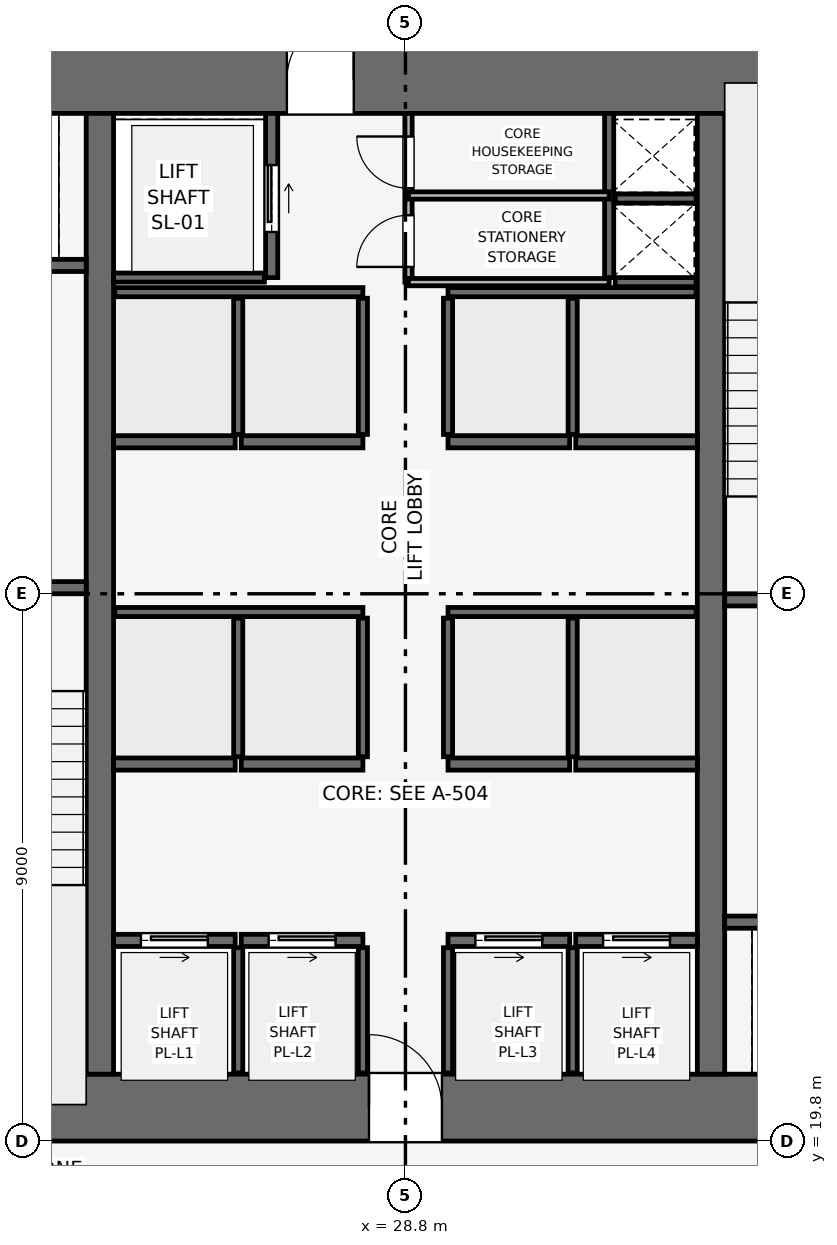
"""IFC4 building model, lengths in metres.
Left out: names, types, materials, properties, quantities, classifications, styles, units other than length and angle.
Written with IfcOpenShell. Run it as: python <this file> out.ifc"""

import sys

from ifc_helpers import new_model, si_unit, direction, frame, frame_2d, origin, place, context, subcontext, project, spatial, rectangle, extrude, element, fill, save


model = new_model("IFC4")
c1 = context("Model", 3, precision=1e-05, world=origin(), true_north=direction((0.0, 1.0)))
c2 = subcontext(c1, "Body", "Model", "MODEL_VIEW")
j1 = project(units=[si_unit("LENGTHUNIT", "METRE"), si_unit("PLANEANGLEUNIT", "RADIAN")], contexts=[c1])
p1 = place(None, origin())
s1 = spatial("IfcSite", under=j1, at=p1, CompositionType="ELEMENT")
p2 = place(p1, origin())
s2 = spatial("IfcBuilding", under=s1, at=p2, CompositionType="ELEMENT")
p3 = place(p2, frame((0.0, 0.0, 57.3)))
s3 = spatial("IfcBuildingStorey", under=s2, at=p3, CompositionType="ELEMENT", Elevation=57.3)
p4 = place(p3, frame((19.8, 20.35, 0.0), z_axis=(0.0, 0.0, 1.0), x_axis=(1.0, 0.0, 0.0)))
e1 = element("IfcWall", 1, at=p4, inside=s3, PredefinedType="SHEAR", context=c2, shape_type="SweptSolid", body=[
    extrude(rectangle(XDim=18.0, YDim=1.1, at=frame_2d((9.0, 0.0))), origin(), (0.0, 0.0, 1.0), 3.9),
])
p5 = place(p4, frame((8.4, 0.0, 0.0)))
e2 = element("IfcOpeningElement", 2, at=p5, cuts=e1, PredefinedType="OPENING", context=c2, shape_type="SweptSolid", body=[
    extrude(rectangle(XDim=1.2, YDim=2.2, at=frame_2d((0.6, 1.1))), frame((0.0, 0.56, 0.0), z_axis=(0.0, -1.0, 0.0), x_axis=(1.0, 0.0, 0.0)), (0.0, 0.0, 1.0), 1.12),
])
p6 = place(p3, frame((19.8, 37.25, 0.0), z_axis=(0.0, 0.0, 1.0), x_axis=(1.0, 0.0, 0.0)))
e3 = element("IfcWall", 3, at=p6, inside=s3, PredefinedType="SHEAR", context=c2, shape_type="SweptSolid", body=[
    extrude(rectangle(XDim=18.0, YDim=1.1, at=frame_2d((9.0, 0.0))), origin(), (0.0, 0.0, 1.0), 3.9),
])
p7 = place(p6, frame((7.05, 0.0, 0.0)))
e4 = element("IfcOpeningElement", 4, at=p7, cuts=e3, PredefinedType="OPENING", context=c2, shape_type="SweptSolid", body=[
    extrude(rectangle(XDim=1.1, YDim=2.15, at=frame_2d((0.55, 1.075))), frame((0.0, 0.56, 0.0), z_axis=(0.0, -1.0, 0.0), x_axis=(1.0, 0.0, 0.0)), (0.0, 0.0, 1.0), 1.12),
])
for number, where, z_axis, x_axis in (
    (5, (23.775, 20.9, 0.0), (0.0, 0.0, 1.0), (0.0, 1.0, 0.0)),
    (6, (33.825, 20.9, 0.0), (0.0, 0.0, 1.0), (0.0, 1.0, 0.0)),
):
    element("IfcWall", number, at=place(p3, frame(where, z_axis=z_axis, x_axis=x_axis)), inside=s3, PredefinedType="SHEAR", context=c2, shape_type="SweptSolid", body=[
        extrude(rectangle(XDim=15.8, YDim=0.45, at=frame_2d((7.9, 0.0))), origin(), (0.0, 0.0, 1.0), 3.9),
    ])
p8 = place(p3, frame((20.4, 28.9, 0.0), z_axis=(0.0, 0.0, 1.0), x_axis=(1.0, 0.0, 0.0)))
e7 = element("IfcWall", 7, at=p8, inside=s3, PredefinedType="SHEAR", context=c2, shape_type="SweptSolid", body=[
    extrude(rectangle(XDim=3.15, YDim=0.2, at=frame_2d((1.575, 0.0))), origin(), (0.0, 0.0, 1.0), 3.65),
])
p9 = place(p8, frame((0.8, 0.0, 0.0)))
e8 = element("IfcOpeningElement", 8, at=p9, cuts=e7, PredefinedType="OPENING", context=c2, shape_type="SweptSolid", body=[
    extrude(rectangle(XDim=1.0, YDim=2.1, at=frame_2d((0.5, 1.05))), frame((0.0, 0.11, 0.0), z_axis=(0.0, -1.0, 0.0), x_axis=(1.0, 0.0, 0.0)), (0.0, 0.0, 1.0), 0.22),
])
p10 = place(p3, frame((34.05, 28.7, 0.0), z_axis=(0.0, 0.0, 1.0), x_axis=(1.0, 0.0, 0.0)))
e9 = element("IfcWall", 9, at=p10, inside=s3, PredefinedType="SHEAR", context=c2, shape_type="SweptSolid", body=[
    extrude(rectangle(XDim=3.15, YDim=0.2, at=frame_2d((1.575, 0.0))), origin(), (0.0, 0.0, 1.0), 3.65),
])
p11 = place(p10, frame((0.8, 0.0, 0.0)))
e10 = element("IfcOpeningElement", 10, at=p11, cuts=e9, PredefinedType="OPENING", context=c2, shape_type="SweptSolid", body=[
    extrude(rectangle(XDim=1.0, YDim=2.1, at=frame_2d((0.5, 1.05))), frame((0.0, 0.11, 0.0), z_axis=(0.0, -1.0, 0.0), x_axis=(1.0, 0.0, 0.0)), (0.0, 0.0, 1.0), 0.22),
])
p12 = place(p3, frame((32.15, 34.0, 0.0), z_axis=(0.0, 0.0, 1.0), x_axis=(0.0, 1.0, 0.0)))
e11 = element("IfcWall", 11, at=p12, inside=s3, PredefinedType="SHEAR", context=c2, shape_type="SweptSolid", body=[
    extrude(rectangle(XDim=2.7, YDim=0.15, at=frame_2d((1.35, 0.0))), origin(), (0.0, 0.0, 1.0), 3.65),
])
for number, where, z_axis, x_axis in (
    (12, (32.25, 33.925, 0.0), (0.0, 0.0, 1.0), (1.0, 0.0, 0.0)),
    (13, (32.25, 35.3, 0.0), (0.0, 0.0, 1.0), (1.0, 0.0, 0.0)),
):
    element("IfcWall", number, at=place(p3, frame(where, z_axis=z_axis, x_axis=x_axis)), inside=s3, PredefinedType="SHEAR", context=c2, shape_type="SweptSolid", body=[
        extrude(rectangle(XDim=1.33, YDim=0.15, at=frame_2d((0.665, 0.0))), origin(), (0.0, 0.0, 1.0), 3.65),
    ])
p13 = place(p3, frame((20.5, 34.2, 0.0), z_axis=(0.0, 0.0, 1.0), x_axis=(1.0, 0.0, 0.0)))
e14 = element("IfcWall", 14, at=p13, inside=s3, PredefinedType="SHEAR", context=c2, shape_type="SweptSolid", body=[
    extrude(rectangle(XDim=3.05, YDim=0.2, at=frame_2d((1.525, 0.0))), origin(), (0.0, 0.0, 1.0), 3.65),
])
p14 = place(p13, frame((0.75, 0.0, 0.0)))
e15 = element("IfcOpeningElement", 15, at=p14, cuts=e14, PredefinedType="OPENING", context=c2, shape_type="SweptSolid", body=[
    extrude(rectangle(XDim=1.1, YDim=2.15, at=frame_2d((0.55, 1.075))), frame((0.0, 0.11, 0.0), z_axis=(0.0, -1.0, 0.0), x_axis=(1.0, 0.0, 0.0)), (0.0, 0.0, 1.0), 0.22),
])
p15 = place(p3, frame((34.05, 23.4, 0.0), z_axis=(0.0, 0.0, 1.0), x_axis=(1.0, 0.0, 0.0)))
e16 = element("IfcWall", 16, at=p15, inside=s3, PredefinedType="SHEAR", context=c2, shape_type="SweptSolid", body=[
    extrude(rectangle(XDim=3.05, YDim=0.2, at=frame_2d((1.525, 0.0))), origin(), (0.0, 0.0, 1.0), 3.65),
])
p16 = place(p15, frame((1.2, 0.0, 0.0)))
e17 = element("IfcOpeningElement", 17, at=p16, cuts=e16, PredefinedType="OPENING", context=c2, shape_type="SweptSolid", body=[
    extrude(rectangle(XDim=1.1, YDim=2.15, at=frame_2d((0.55, 1.075))), frame((0.0, 0.11, 0.0), z_axis=(0.0, -1.0, 0.0), x_axis=(1.0, 0.0, 0.0)), (0.0, 0.0, 1.0), 0.22),
])
p17 = place(p3, frame((26.6, 34.0, 0.0), z_axis=(0.0, 0.0, 1.0), x_axis=(0.0, 1.0, 0.0)))
e18 = element("IfcWall", 18, at=p17, inside=s3, PredefinedType="SHEAR", context=c2, shape_type="SweptSolid", body=[
    extrude(rectangle(XDim=2.7, YDim=0.2, at=frame_2d((1.35, 0.0))), origin(), (0.0, 0.0, 1.0), 3.65),
])
p18 = place(p17, frame((0.75, 0.0, 0.0)))
e19 = element("IfcOpeningElement", 19, at=p18, cuts=e18, PredefinedType="OPENING", context=c2, shape_type="SweptSolid", body=[
    extrude(rectangle(XDim=1.1, YDim=2.15, at=frame_2d((0.55, 1.075))), frame((0.0, 0.11, 0.0), z_axis=(0.0, -1.0, 0.0), x_axis=(1.0, 0.0, 0.0)), (0.0, 0.0, 1.0), 0.22),
])
p19 = place(p3, frame((24.0, 34.0, 0.0), z_axis=(0.0, 0.0, 1.0), x_axis=(1.0, 0.0, 0.0)))
e20 = element("IfcWall", 20, at=p19, inside=s3, PredefinedType="SHEAR", context=c2, shape_type="SweptSolid", body=[
    extrude(rectangle(XDim=2.48, YDim=0.15, at=frame_2d((1.24, 0.0))), origin(), (0.0, 0.0, 1.0), 3.65),
])
p20 = place(p3, frame((24.0, 23.1, 0.0), z_axis=(0.0, 0.0, 1.0), x_axis=(1.0, 0.0, 0.0)))
e21 = element("IfcWall", 21, at=p20, inside=s3, PredefinedType="SHEAR", context=c2, shape_type="SweptSolid", body=[
    extrude(rectangle(XDim=2.0, YDim=0.2, at=frame_2d((1.0, 0.0))), origin(), (0.0, 0.0, 1.0), 3.65),
])
p21 = place(p20, frame((0.45, 0.0, 0.0)))
e22 = element("IfcOpeningElement", 22, at=p21, cuts=e21, PredefinedType="OPENING", context=c2, shape_type="SweptSolid", body=[
    extrude(rectangle(XDim=1.1, YDim=2.15, at=frame_2d((0.55, 1.075))), frame((0.0, 0.11, 0.0), z_axis=(0.0, -1.0, 0.0), x_axis=(1.0, 0.0, 0.0)), (0.0, 0.0, 1.0), 0.22),
])
p22 = place(p3, frame((26.1, 23.1, 0.0), z_axis=(0.0, 0.0, 1.0), x_axis=(1.0, 0.0, 0.0)))
e23 = element("IfcWall", 23, at=p22, inside=s3, PredefinedType="SHEAR", context=c2, shape_type="SweptSolid", body=[
    extrude(rectangle(XDim=2.0, YDim=0.2, at=frame_2d((1.0, 0.0))), origin(), (0.0, 0.0, 1.0), 3.65),
])
p23 = place(p22, frame((0.45, 0.0, 0.0)))
e24 = element("IfcOpeningElement", 24, at=p23, cuts=e23, PredefinedType="OPENING", context=c2, shape_type="SweptSolid", body=[
    extrude(rectangle(XDim=1.1, YDim=2.15, at=frame_2d((0.55, 1.075))), frame((0.0, 0.11, 0.0), z_axis=(0.0, -1.0, 0.0), x_axis=(1.0, 0.0, 0.0)), (0.0, 0.0, 1.0), 0.22),
])
p24 = place(p3, frame((29.5, 23.1, 0.0), z_axis=(0.0, 0.0, 1.0), x_axis=(1.0, 0.0, 0.0)))
e25 = element("IfcWall", 25, at=p24, inside=s3, PredefinedType="SHEAR", context=c2, shape_type="SweptSolid", body=[
    extrude(rectangle(XDim=2.0, YDim=0.2, at=frame_2d((1.0, 0.0))), origin(), (0.0, 0.0, 1.0), 3.65),
])
p25 = place(p24, frame((0.45, 0.0, 0.0)))
e26 = element("IfcOpeningElement", 26, at=p25, cuts=e25, PredefinedType="OPENING", context=c2, shape_type="SweptSolid", body=[
    extrude(rectangle(XDim=1.1, YDim=2.15, at=frame_2d((0.55, 1.075))), frame((0.0, 0.11, 0.0), z_axis=(0.0, -1.0, 0.0), x_axis=(1.0, 0.0, 0.0)), (0.0, 0.0, 1.0), 0.22),
])
p26 = place(p3, frame((31.6, 23.1, 0.0), z_axis=(0.0, 0.0, 1.0), x_axis=(1.0, 0.0, 0.0)))
e27 = element("IfcWall", 27, at=p26, inside=s3, PredefinedType="SHEAR", context=c2, shape_type="SweptSolid", body=[
    extrude(rectangle(XDim=2.0, YDim=0.2, at=frame_2d((1.0, 0.0))), origin(), (0.0, 0.0, 1.0), 3.65),
])
p27 = place(p26, frame((0.45, 0.0, 0.0)))
e28 = element("IfcOpeningElement", 28, at=p27, cuts=e27, PredefinedType="OPENING", context=c2, shape_type="SweptSolid", body=[
    extrude(rectangle(XDim=1.1, YDim=2.15, at=frame_2d((0.55, 1.075))), frame((0.0, 0.11, 0.0), z_axis=(0.0, -1.0, 0.0), x_axis=(1.0, 0.0, 0.0)), (0.0, 0.0, 1.0), 0.22),
])
for number, where, z_axis, x_axis in (
    (29, (24.0, 26.0, 0.0), (0.0, 0.0, 1.0), (1.0, 0.0, 0.0)),
    (30, (26.1, 26.0, 0.0), (0.0, 0.0, 1.0), (1.0, 0.0, 0.0)),
    (31, (29.5, 26.0, 0.0), (0.0, 0.0, 1.0), (1.0, 0.0, 0.0)),
    (32, (31.6, 26.0, 0.0), (0.0, 0.0, 1.0), (1.0, 0.0, 0.0)),
    (33, (24.0, 31.3, 0.0), (0.0, 0.0, 1.0), (1.0, 0.0, 0.0)),
    (34, (26.1, 31.3, 0.0), (0.0, 0.0, 1.0), (1.0, 0.0, 0.0)),
    (35, (29.5, 31.3, 0.0), (0.0, 0.0, 1.0), (1.0, 0.0, 0.0)),
    (36, (31.6, 31.3, 0.0), (0.0, 0.0, 1.0), (1.0, 0.0, 0.0)),
):
    element("IfcWall", number, at=place(p3, frame(where, z_axis=z_axis, x_axis=x_axis)), inside=s3, PredefinedType="SHEAR", context=c2, shape_type="SweptSolid", body=[
        extrude(rectangle(XDim=2.0, YDim=0.2, at=frame_2d((1.0, 0.0))), origin(), (0.0, 0.0, 1.0), 3.65),
    ])
for number, where, z_axis, x_axis in (
    (37, (26.05, 20.92, 0.0), (0.0, 0.0, 1.0), (0.0, 1.0, 0.0)),
    (38, (28.1, 20.92, 0.0), (0.0, 0.0, 1.0), (0.0, 1.0, 0.0)),
    (39, (29.5, 20.92, 0.0), (0.0, 0.0, 1.0), (0.0, 1.0, 0.0)),
    (40, (31.55, 20.92, 0.0), (0.0, 0.0, 1.0), (0.0, 1.0, 0.0)),
):
    element("IfcWall", number, at=place(p3, frame(where, z_axis=z_axis, x_axis=x_axis)), inside=s3, PredefinedType="SHEAR", context=c2, shape_type="SweptSolid", body=[
        extrude(rectangle(XDim=2.06, YDim=0.15, at=frame_2d((1.03, 0.0))), origin(), (0.0, 0.0, 1.0), 3.65),
    ])
for number, where, z_axis, x_axis in (
    (41, (24.02, 28.5, 0.0), (0.0, 0.0, 1.0), (1.0, 0.0, 0.0)),
    (42, (29.5, 28.5, 0.0), (0.0, 0.0, 1.0), (1.0, 0.0, 0.0)),
):
    element("IfcWall", number, at=place(p3, frame(where, z_axis=z_axis, x_axis=x_axis)), inside=s3, PredefinedType="SHEAR", context=c2, shape_type="SweptSolid", body=[
        extrude(rectangle(XDim=4.08, YDim=0.15, at=frame_2d((2.04, 0.0))), origin(), (0.0, 0.0, 1.0), 3.65),
    ])
for number, where, z_axis, x_axis in (
    (43, (26.05, 26.12, 0.0), (0.0, 0.0, 1.0), (0.0, 1.0, 0.0)),
    (44, (28.1, 26.12, 0.0), (0.0, 0.0, 1.0), (0.0, 1.0, 0.0)),
    (45, (29.5, 26.12, 0.0), (0.0, 0.0, 1.0), (0.0, 1.0, 0.0)),
    (46, (31.55, 26.12, 0.0), (0.0, 0.0, 1.0), (0.0, 1.0, 0.0)),
):
    element("IfcWall", number, at=place(p3, frame(where, z_axis=z_axis, x_axis=x_axis)), inside=s3, PredefinedType="SHEAR", context=c2, shape_type="SweptSolid", body=[
        extrude(rectangle(XDim=2.28, YDim=0.15, at=frame_2d((1.14, 0.0))), origin(), (0.0, 0.0, 1.0), 3.65),
    ])
for number, where, z_axis, x_axis in (
    (47, (24.02, 33.76, 0.0), (0.0, 0.0, 1.0), (1.0, 0.0, 0.0)),
    (48, (29.5, 33.76, 0.0), (0.0, 0.0, 1.0), (1.0, 0.0, 0.0)),
):
    element("IfcWall", number, at=place(p3, frame(where, z_axis=z_axis, x_axis=x_axis)), inside=s3, PredefinedType="SHEAR", context=c2, shape_type="SweptSolid", body=[
        extrude(rectangle(XDim=4.08, YDim=0.15, at=frame_2d((2.04, 0.0))), origin(), (0.0, 0.0, 1.0), 3.65),
    ])
for number, where, z_axis, x_axis in (
    (49, (26.05, 31.42, 0.0), (0.0, 0.0, 1.0), (0.0, 1.0, 0.0)),
    (50, (28.1, 31.42, 0.0), (0.0, 0.0, 1.0), (0.0, 1.0, 0.0)),
    (51, (29.5, 31.42, 0.0), (0.0, 0.0, 1.0), (0.0, 1.0, 0.0)),
    (52, (31.55, 31.42, 0.0), (0.0, 0.0, 1.0), (0.0, 1.0, 0.0)),
):
    element("IfcWall", number, at=place(p3, frame(where, z_axis=z_axis, x_axis=x_axis)), inside=s3, PredefinedType="SHEAR", context=c2, shape_type="SweptSolid", body=[
        extrude(rectangle(XDim=2.24, YDim=0.15, at=frame_2d((1.12, 0.0))), origin(), (0.0, 0.0, 1.0), 3.65),
    ])
p28 = place(p3, frame((28.85, 33.925, 0.0), z_axis=(0.0, 0.0, 1.0), x_axis=(0.0, 1.0, 0.0)))
e53 = element("IfcWall", 53, at=p28, inside=s3, PredefinedType="PARTITIONING", context=c2, shape_type="SweptSolid", body=[
    extrude(rectangle(XDim=2.775, YDim=0.12, at=frame_2d((1.387, 0.0))), origin(), (0.0, 0.0, 1.0), 3.65),
])
p29 = place(p28, frame((0.25, 0.0, 0.0)))
e54 = element("IfcOpeningElement", 54, at=p29, cuts=e53, PredefinedType="OPENING", context=c2, shape_type="SweptSolid", body=[
    extrude(rectangle(XDim=0.85, YDim=2.1, at=frame_2d((0.425, 1.05))), frame((0.0, 0.07, 0.0), z_axis=(0.0, -1.0, 0.0), x_axis=(1.0, 0.0, 0.0)), (0.0, 0.0, 1.0), 0.14),
])
p30 = place(p28, frame((1.545, 0.0, 0.0)))
e55 = element("IfcOpeningElement", 55, at=p30, cuts=e53, PredefinedType="OPENING", context=c2, shape_type="SweptSolid", body=[
    extrude(rectangle(XDim=0.85, YDim=2.1, at=frame_2d((0.425, 1.05))), frame((0.0, 0.07, 0.0), z_axis=(0.0, -1.0, 0.0), x_axis=(1.0, 0.0, 0.0)), (0.0, 0.0, 1.0), 0.14),
])
for number, where, z_axis, x_axis in (
    (56, (28.85, 35.35, 0.0), (0.0, 0.0, 1.0), (1.0, 0.0, 0.0)),
    (57, (28.85, 33.925, 0.0), (0.0, 0.0, 1.0), (1.0, 0.0, 0.0)),
):
    element("IfcWall", number, at=place(p3, frame(where, z_axis=z_axis, x_axis=x_axis)), inside=s3, PredefinedType="PARTITIONING", context=c2, shape_type="SweptSolid", body=[
        extrude(rectangle(XDim=3.3, YDim=0.12, at=frame_2d((1.65, 0.0))), origin(), (0.0, 0.0, 1.0), 3.65),
    ])
p31 = place(p18, origin())
e58 = element("IfcDoor", 58, at=p31, inside=s3, OperationType="SLIDING_TO_RIGHT", PredefinedType="DOOR", context=c2, shape_type="SweptSolid", body=[
    extrude(rectangle(XDim=1.1, YDim=2.15, at=frame_2d((0.55, 1.075))), frame((0.0, 0.025, 0.0), z_axis=(0.0, -1.0, 0.0), x_axis=(1.0, 0.0, 0.0)), (0.0, 0.0, 1.0), 0.05),
])
fill(e19, e58)
p32 = place(p21, origin())
e59 = element("IfcDoor", 59, at=p32, inside=s3, OperationType="SLIDING_TO_RIGHT", PredefinedType="DOOR", context=c2, shape_type="SweptSolid", body=[
    extrude(rectangle(XDim=1.1, YDim=2.15, at=frame_2d((0.55, 1.075))), frame((0.0, 0.025, 0.0), z_axis=(0.0, -1.0, 0.0), x_axis=(1.0, 0.0, 0.0)), (0.0, 0.0, 1.0), 0.05),
])
fill(e22, e59)
p33 = place(p23, origin())
e60 = element("IfcDoor", 60, at=p33, inside=s3, OperationType="SLIDING_TO_RIGHT", PredefinedType="DOOR", context=c2, shape_type="SweptSolid", body=[
    extrude(rectangle(XDim=1.1, YDim=2.15, at=frame_2d((0.55, 1.075))), frame((0.0, 0.025, 0.0), z_axis=(0.0, -1.0, 0.0), x_axis=(1.0, 0.0, 0.0)), (0.0, 0.0, 1.0), 0.05),
])
fill(e24, e60)
p34 = place(p25, origin())
e61 = element("IfcDoor", 61, at=p34, inside=s3, OperationType="SLIDING_TO_RIGHT", PredefinedType="DOOR", context=c2, shape_type="SweptSolid", body=[
    extrude(rectangle(XDim=1.1, YDim=2.15, at=frame_2d((0.55, 1.075))), frame((0.0, 0.025, 0.0), z_axis=(0.0, -1.0, 0.0), x_axis=(1.0, 0.0, 0.0)), (0.0, 0.0, 1.0), 0.05),
])
fill(e26, e61)
p35 = place(p27, origin())
e62 = element("IfcDoor", 62, at=p35, inside=s3, OperationType="SLIDING_TO_RIGHT", PredefinedType="DOOR", context=c2, shape_type="SweptSolid", body=[
    extrude(rectangle(XDim=1.1, YDim=2.15, at=frame_2d((0.55, 1.075))), frame((0.0, 0.025, 0.0), z_axis=(0.0, -1.0, 0.0), x_axis=(1.0, 0.0, 0.0)), (0.0, 0.0, 1.0), 0.05),
])
fill(e28, e62)
p36 = place(p29, origin())
e63 = element("IfcDoor", 63, at=p36, inside=s3, OperationType="SINGLE_SWING_LEFT", PredefinedType="DOOR", context=c2, shape_type="SweptSolid", body=[
    extrude(rectangle(XDim=0.85, YDim=2.1, at=frame_2d((0.425, 1.05))), frame((0.0, 0.025, 0.0), z_axis=(0.0, -1.0, 0.0), x_axis=(1.0, 0.0, 0.0)), (0.0, 0.0, 1.0), 0.05),
])
fill(e54, e63)
p37 = place(p30, origin())
e64 = element("IfcDoor", 64, at=p37, inside=s3, OperationType="SINGLE_SWING_RIGHT", PredefinedType="DOOR", context=c2, shape_type="SweptSolid", body=[
    extrude(rectangle(XDim=0.85, YDim=2.1, at=frame_2d((0.425, 1.05))), frame((0.0, 0.025, 0.0), z_axis=(0.0, -1.0, 0.0), x_axis=(1.0, 0.0, 0.0)), (0.0, 0.0, 1.0), 0.05),
])
fill(e55, e64)
p38 = place(p5, origin())
e65 = element("IfcDoor", 65, at=p38, inside=s3, OperationType="SINGLE_SWING_LEFT", PredefinedType="DOOR", context=c2, shape_type="SweptSolid", body=[
    extrude(rectangle(XDim=1.2, YDim=2.2, at=frame_2d((0.6, 1.1))), frame((0.0, 0.025, 0.0), z_axis=(0.0, -1.0, 0.0), x_axis=(1.0, 0.0, 0.0)), (0.0, 0.0, 1.0), 0.05),
])
fill(e2, e65)
p39 = place(p7, origin())
e66 = element("IfcDoor", 66, at=p39, inside=s3, OperationType="SINGLE_SWING_RIGHT", PredefinedType="DOOR", context=c2, shape_type="SweptSolid", body=[
    extrude(rectangle(XDim=1.1, YDim=2.15, at=frame_2d((0.55, 1.075))), frame((0.0, 0.025, 0.0), z_axis=(0.0, -1.0, 0.0), x_axis=(1.0, 0.0, 0.0)), (0.0, 0.0, 1.0), 0.05),
])
fill(e4, e66)
save(model, sys.argv[1])
